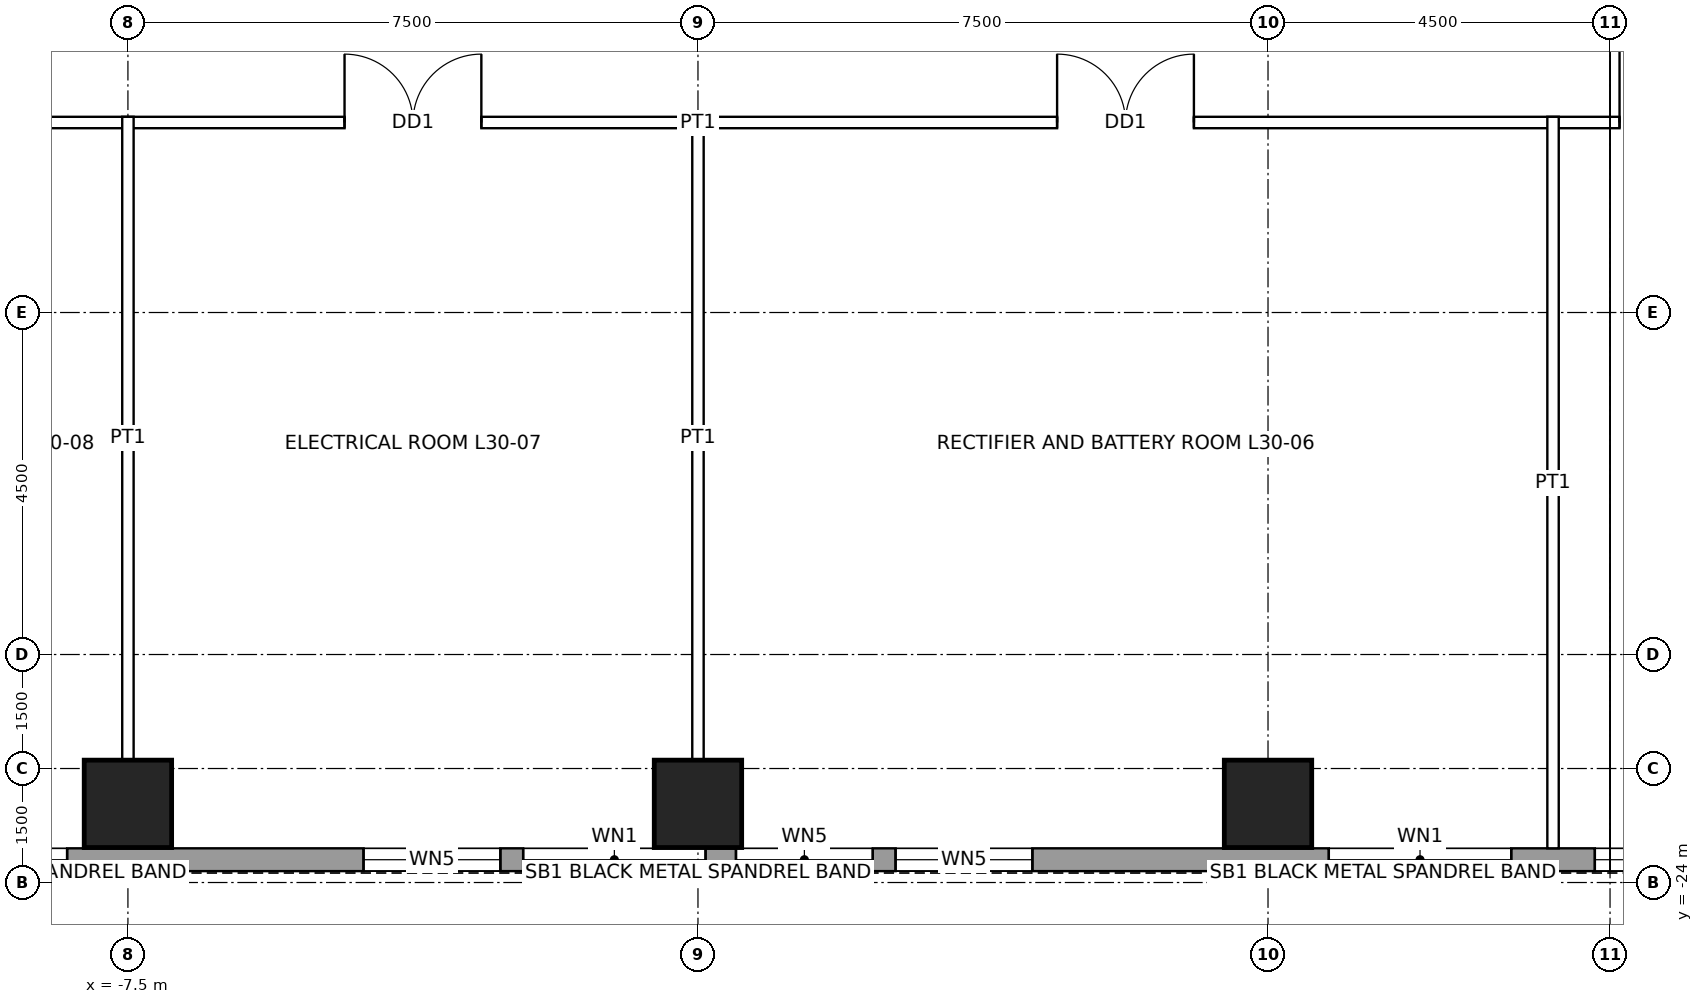
"""IFC4 building model, lengths in metres.
Left out: names, types, materials, properties, quantities, classifications, styles, units other than length and angle.
Written with IfcOpenShell. Run it as: python <this file> out.ifc"""

import sys

from ifc_helpers import new_model, si_unit, direction, frame, frame_2d, origin, origin_2d, place, context, subcontext, project, spatial, rectangle, hollow_rectangle, extrude, element, fill, save


model = new_model("IFC4")
c1 = context("Model", 3, precision=1e-05, world=origin(), true_north=direction((0.0, 1.0)))
c2 = subcontext(c1, "Body", "Model", "MODEL_VIEW")
j1 = project(units=[si_unit("LENGTHUNIT", "METRE"), si_unit("PLANEANGLEUNIT", "RADIAN")], contexts=[c1])
p1 = place(None, origin())
s1 = spatial("IfcSite", under=j1, at=p1, CompositionType="ELEMENT")
p2 = place(p1, origin())
s2 = spatial("IfcBuilding", under=s1, at=p2, CompositionType="ELEMENT")
p3 = place(p2, frame((0.0, 0.0, 149.4)))
s3 = spatial("IfcBuildingStorey", under=s2, at=p3, CompositionType="ELEMENT", Elevation=149.4)
for number, where, z_axis, x_axis in (
    (1, (7.5, -22.965, 0.0), (0.0, 0.0, 1.0), (1.0, 0.0, 0.0)),
    (2, (0.0, -22.965, 0.0), (0.0, 0.0, 1.0), (1.0, 0.0, 0.0)),
    (3, (-7.5, -22.965, 0.0), (0.0, 0.0, 1.0), (1.0, 0.0, 0.0)),
):
    element("IfcColumn", number, at=place(p3, frame(where, z_axis=z_axis, x_axis=x_axis)), inside=s3, PredefinedType="COLUMN", context=c2, shape_type="SweptSolid", body=[
        extrude(hollow_rectangle(XDim=1.15, YDim=1.15, WallThickness=0.075, at=origin_2d()), origin(), (0.0, 0.0, 1.0), 4.5),
    ])
p4 = place(p3, frame((16.2, -23.7, 0.0), z_axis=(0.0, 0.0, 1.0), x_axis=(-1.0, 0.0, 0.0)))
e4 = element("IfcWall", 4, at=p4, inside=s3, PredefinedType="SOLIDWALL", context=c2, shape_type="SweptSolid", body=[
    extrude(rectangle(XDim=32.4, YDim=0.3, at=frame_2d((16.2, 0.0))), origin(), (0.0, 0.0, 1.0), 4.3),
])
p5 = place(p4, frame((2.0, 0.0, 1.0)))
e5 = element("IfcOpeningElement", 5, at=p5, cuts=e4, PredefinedType="OPENING", context=c2, shape_type="SweptSolid", body=[
    extrude(rectangle(XDim=2.4, YDim=1.2, at=frame_2d((1.2, 0.6))), frame((0.0, 0.16, 0.0), z_axis=(0.0, -1.0, 0.0), x_axis=(1.0, 0.0, 0.0)), (0.0, 0.0, 1.0), 0.32),
])
p6 = place(p4, frame((5.5, 0.0, 1.0)))
e6 = element("IfcOpeningElement", 6, at=p6, cuts=e4, PredefinedType="OPENING", context=c2, shape_type="SweptSolid", body=[
    extrude(rectangle(XDim=2.4, YDim=1.2, at=frame_2d((1.2, 0.6))), frame((0.0, 0.16, 0.0), z_axis=(0.0, -1.0, 0.0), x_axis=(1.0, 0.0, 0.0)), (0.0, 0.0, 1.0), 0.32),
])
p7 = place(p4, frame((11.8, 0.0, 1.0)))
e7 = element("IfcOpeningElement", 7, at=p7, cuts=e4, PredefinedType="OPENING", context=c2, shape_type="SweptSolid", body=[
    extrude(rectangle(XDim=1.8, YDim=1.2, at=frame_2d((0.9, 0.6))), frame((0.0, 0.16, 0.0), z_axis=(0.0, -1.0, 0.0), x_axis=(1.0, 0.0, 0.0)), (0.0, 0.0, 1.0), 0.32),
])
p8 = place(p4, frame((13.9, 0.0, 1.0)))
e8 = element("IfcOpeningElement", 8, at=p8, cuts=e4, PredefinedType="OPENING", context=c2, shape_type="SweptSolid", body=[
    extrude(rectangle(XDim=1.8, YDim=1.2, at=frame_2d((0.9, 0.6))), frame((0.0, 0.16, 0.0), z_axis=(0.0, -1.0, 0.0), x_axis=(1.0, 0.0, 0.0)), (0.0, 0.0, 1.0), 0.32),
])
p9 = place(p4, frame((16.1, 0.0, 1.0)))
e9 = element("IfcOpeningElement", 9, at=p9, cuts=e4, PredefinedType="OPENING", context=c2, shape_type="SweptSolid", body=[
    extrude(rectangle(XDim=2.4, YDim=1.2, at=frame_2d((1.2, 0.6))), frame((0.0, 0.16, 0.0), z_axis=(0.0, -1.0, 0.0), x_axis=(1.0, 0.0, 0.0)), (0.0, 0.0, 1.0), 0.32),
])
p10 = place(p4, frame((18.8, 0.0, 1.0)))
e10 = element("IfcOpeningElement", 10, at=p10, cuts=e4, PredefinedType="OPENING", context=c2, shape_type="SweptSolid", body=[
    extrude(rectangle(XDim=1.8, YDim=1.2, at=frame_2d((0.9, 0.6))), frame((0.0, 0.16, 0.0), z_axis=(0.0, -1.0, 0.0), x_axis=(1.0, 0.0, 0.0)), (0.0, 0.0, 1.0), 0.32),
])
p11 = place(p4, frame((24.5, 0.0, 1.0)))
e11 = element("IfcOpeningElement", 11, at=p11, cuts=e4, PredefinedType="OPENING", context=c2, shape_type="SweptSolid", body=[
    extrude(rectangle(XDim=2.4, YDim=1.2, at=frame_2d((1.2, 0.6))), frame((0.0, 0.16, 0.0), z_axis=(0.0, -1.0, 0.0), x_axis=(1.0, 0.0, 0.0)), (0.0, 0.0, 1.0), 0.32),
])
p12 = place(p4, frame((28.0, 0.0, 1.0)))
e12 = element("IfcOpeningElement", 12, at=p12, cuts=e4, PredefinedType="OPENING", context=c2, shape_type="SweptSolid", body=[
    extrude(rectangle(XDim=2.4, YDim=1.2, at=frame_2d((1.2, 0.6))), frame((0.0, 0.16, 0.0), z_axis=(0.0, -1.0, 0.0), x_axis=(1.0, 0.0, 0.0)), (0.0, 0.0, 1.0), 0.32),
])
p13 = place(p3, frame((-14.075, -14.0, 0.0), z_axis=(0.0, 0.0, 1.0), x_axis=(1.0, 0.0, 0.0)))
e13 = element("IfcWall", 13, at=p13, inside=s3, PredefinedType="PARTITIONING", context=c2, shape_type="SweptSolid", body=[
    extrude(rectangle(XDim=28.15, YDim=0.15, at=frame_2d((14.075, 0.0))), origin(), (0.0, 0.0, 1.0), 4.3),
])
p14 = place(p13, frame((18.8, 0.0, 0.0)))
e14 = element("IfcOpeningElement", 14, at=p14, cuts=e13, PredefinedType="OPENING", context=c2, shape_type="SweptSolid", body=[
    extrude(rectangle(XDim=1.8, YDim=2.4, at=frame_2d((0.9, 1.2))), frame((0.0, 0.085, 0.0), z_axis=(0.0, -1.0, 0.0), x_axis=(1.0, 0.0, 0.0)), (0.0, 0.0, 1.0), 0.17),
])
p15 = place(p13, frame((9.425, 0.0, 0.0)))
e15 = element("IfcOpeningElement", 15, at=p15, cuts=e13, PredefinedType="OPENING", context=c2, shape_type="SweptSolid", body=[
    extrude(rectangle(XDim=1.8, YDim=2.4, at=frame_2d((0.9, 1.2))), frame((0.0, 0.085, 0.0), z_axis=(0.0, -1.0, 0.0), x_axis=(1.0, 0.0, 0.0)), (0.0, 0.0, 1.0), 0.17),
])
p16 = place(p13, frame((4.2, 0.0, 0.0)))
e16 = element("IfcOpeningElement", 16, at=p16, cuts=e13, PredefinedType="OPENING", context=c2, shape_type="SweptSolid", body=[
    extrude(rectangle(XDim=1.0, YDim=2.1, at=frame_2d((0.5, 1.05))), frame((0.0, 0.085, 0.0), z_axis=(0.0, -1.0, 0.0), x_axis=(1.0, 0.0, 0.0)), (0.0, 0.0, 1.0), 0.17),
])
p17 = place(p13, frame((26.2, 0.0, 0.0)))
e17 = element("IfcOpeningElement", 17, at=p17, cuts=e13, PredefinedType="OPENING", context=c2, shape_type="SweptSolid", body=[
    extrude(rectangle(XDim=1.0, YDim=2.1, at=frame_2d((0.5, 1.05))), frame((0.0, 0.085, 0.0), z_axis=(0.0, -1.0, 0.0), x_axis=(1.0, 0.0, 0.0)), (0.0, 0.0, 1.0), 0.17),
])
p18 = place(p13, frame((0.95, 0.0, 0.0)))
e18 = element("IfcOpeningElement", 18, at=p18, cuts=e13, PredefinedType="OPENING", context=c2, shape_type="SweptSolid", body=[
    extrude(rectangle(XDim=1.0, YDim=2.1, at=frame_2d((0.5, 1.05))), frame((0.0, 0.085, 0.0), z_axis=(0.0, -1.0, 0.0), x_axis=(1.0, 0.0, 0.0)), (0.0, 0.0, 1.0), 0.17),
])
for number, where, z_axis, x_axis in (
    (19, (-7.5, -22.39, 0.0), (0.0, 0.0, 1.0), (0.0, 1.0, 0.0)),
    (20, (0.0, -22.39, 0.0), (0.0, 0.0, 1.0), (0.0, 1.0, 0.0)),
):
    element("IfcWall", number, at=place(p3, frame(where, z_axis=z_axis, x_axis=x_axis)), inside=s3, PredefinedType="PARTITIONING", context=c2, shape_type="SweptSolid", body=[
        extrude(rectangle(XDim=8.465, YDim=0.15, at=frame_2d((4.232, 0.0))), origin(), (0.0, 0.0, 1.0), 3.431),
    ])
p19 = place(p3, frame((11.25, -23.55, 0.0), z_axis=(0.0, 0.0, 1.0), x_axis=(0.0, 1.0, 0.0)))
e21 = element("IfcWall", 21, at=p19, inside=s3, PredefinedType="PARTITIONING", context=c2, shape_type="SweptSolid", body=[
    extrude(rectangle(XDim=9.625, YDim=0.15, at=frame_2d((4.812, 0.0))), origin(), (0.0, 0.0, 1.0), 3.431),
])
p20 = place(p5, origin())
e22 = element("IfcWindow", 22, at=p20, inside=s3, PartitioningType="SINGLE_PANEL", PredefinedType="WINDOW", context=c2, shape_type="SweptSolid", body=[
    extrude(rectangle(XDim=2.4, YDim=1.2, at=frame_2d((1.2, 0.6))), frame((0.0, 0.03, 0.0), z_axis=(0.0, -1.0, 0.0), x_axis=(1.0, 0.0, 0.0)), (0.0, 0.0, 1.0), 0.06),
])
fill(e5, e22)
p21 = place(p6, origin())
e23 = element("IfcWindow", 23, at=p21, inside=s3, PartitioningType="SINGLE_PANEL", PredefinedType="WINDOW", context=c2, shape_type="SweptSolid", body=[
    extrude(rectangle(XDim=2.4, YDim=1.2, at=frame_2d((1.2, 0.6))), frame((0.0, 0.03, 0.0), z_axis=(0.0, -1.0, 0.0), x_axis=(1.0, 0.0, 0.0)), (0.0, 0.0, 1.0), 0.06),
])
fill(e6, e23)
p22 = place(p7, origin())
e24 = element("IfcWindow", 24, at=p22, inside=s3, PartitioningType="SINGLE_PANEL", PredefinedType="WINDOW", context=c2, shape_type="SweptSolid", body=[
    extrude(rectangle(XDim=1.8, YDim=1.2, at=frame_2d((0.9, 0.6))), frame((0.0, 0.03, 0.0), z_axis=(0.0, -1.0, 0.0), x_axis=(1.0, 0.0, 0.0)), (0.0, 0.0, 1.0), 0.06),
])
fill(e7, e24)
p23 = place(p8, origin())
e25 = element("IfcWindow", 25, at=p23, inside=s3, PartitioningType="SINGLE_PANEL", PredefinedType="WINDOW", context=c2, shape_type="SweptSolid", body=[
    extrude(rectangle(XDim=1.8, YDim=1.2, at=frame_2d((0.9, 0.6))), frame((0.0, 0.03, 0.0), z_axis=(0.0, -1.0, 0.0), x_axis=(1.0, 0.0, 0.0)), (0.0, 0.0, 1.0), 0.06),
])
fill(e8, e25)
p24 = place(p9, origin())
e26 = element("IfcWindow", 26, at=p24, inside=s3, PartitioningType="SINGLE_PANEL", PredefinedType="WINDOW", context=c2, shape_type="SweptSolid", body=[
    extrude(rectangle(XDim=2.4, YDim=1.2, at=frame_2d((1.2, 0.6))), frame((0.0, 0.03, 0.0), z_axis=(0.0, -1.0, 0.0), x_axis=(1.0, 0.0, 0.0)), (0.0, 0.0, 1.0), 0.06),
])
fill(e9, e26)
p25 = place(p10, origin())
e27 = element("IfcWindow", 27, at=p25, inside=s3, PartitioningType="SINGLE_PANEL", PredefinedType="WINDOW", context=c2, shape_type="SweptSolid", body=[
    extrude(rectangle(XDim=1.8, YDim=1.2, at=frame_2d((0.9, 0.6))), frame((0.0, 0.03, 0.0), z_axis=(0.0, -1.0, 0.0), x_axis=(1.0, 0.0, 0.0)), (0.0, 0.0, 1.0), 0.06),
])
fill(e10, e27)
p26 = place(p11, origin())
e28 = element("IfcWindow", 28, at=p26, inside=s3, PartitioningType="SINGLE_PANEL", PredefinedType="WINDOW", context=c2, shape_type="SweptSolid", body=[
    extrude(rectangle(XDim=2.4, YDim=1.2, at=frame_2d((1.2, 0.6))), frame((0.0, 0.03, 0.0), z_axis=(0.0, -1.0, 0.0), x_axis=(1.0, 0.0, 0.0)), (0.0, 0.0, 1.0), 0.06),
])
fill(e11, e28)
p27 = place(p14, origin())
e29 = element("IfcDoor", 29, at=p27, inside=s3, OperationType="DOUBLE_DOOR_SINGLE_SWING", PredefinedType="DOOR", context=c2, shape_type="SweptSolid", body=[
    extrude(rectangle(XDim=1.8, YDim=2.4, at=frame_2d((0.9, 1.2))), frame((0.0, 0.025, 0.0), z_axis=(0.0, -1.0, 0.0), x_axis=(1.0, 0.0, 0.0)), (0.0, 0.0, 1.0), 0.05),
])
fill(e14, e29)
p28 = place(p15, origin())
e30 = element("IfcDoor", 30, at=p28, inside=s3, OperationType="DOUBLE_DOOR_SINGLE_SWING", PredefinedType="DOOR", context=c2, shape_type="SweptSolid", body=[
    extrude(rectangle(XDim=1.8, YDim=2.4, at=frame_2d((0.9, 1.2))), frame((0.0, 0.025, 0.0), z_axis=(0.0, -1.0, 0.0), x_axis=(1.0, 0.0, 0.0)), (0.0, 0.0, 1.0), 0.05),
])
fill(e15, e30)
p29 = place(p17, origin())
e31 = element("IfcDoor", 31, at=p29, inside=s3, OperationType="SINGLE_SWING_LEFT", PredefinedType="DOOR", context=c2, shape_type="SweptSolid", body=[
    extrude(rectangle(XDim=1.0, YDim=2.1, at=frame_2d((0.5, 1.05))), frame((0.0, 0.025, 0.0), z_axis=(0.0, -1.0, 0.0), x_axis=(1.0, 0.0, 0.0)), (0.0, 0.0, 1.0), 0.05),
])
fill(e17, e31)
save(model, sys.argv[1])
